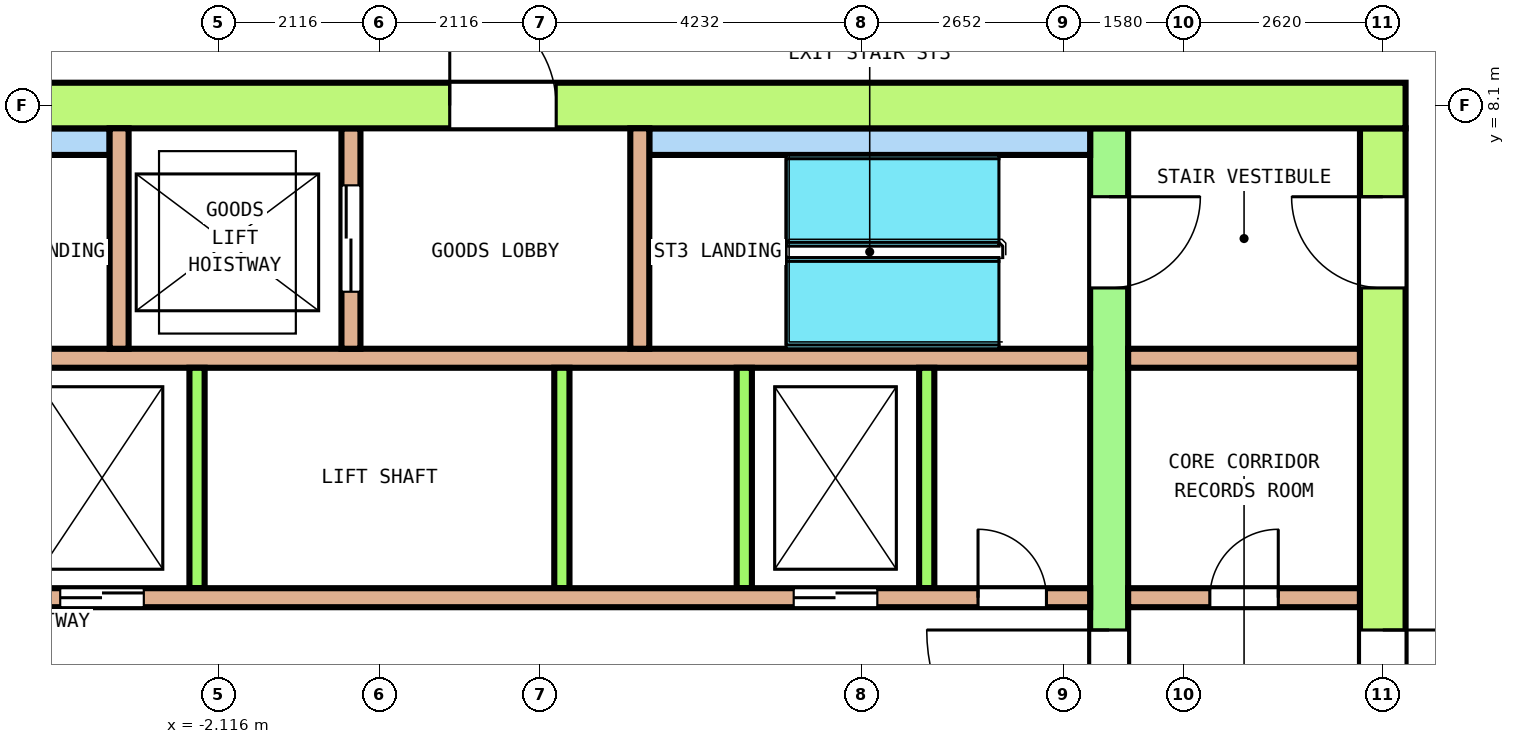
"""IFC4 building model, lengths in metres.
Left out: names, types, materials, properties, quantities, classifications, styles, units other than length and angle.
Written with IfcOpenShell. Run it as: python <this file> out.ifc"""

import sys

from ifc_helpers import new_model, si_unit, direction, frame, frame_2d, origin, place, context, subcontext, project, spatial, rectangle, extrude, element, fill, save


model = new_model("IFC4")
c1 = context("Model", 3, precision=1e-05, world=origin(), true_north=direction((0.0, 1.0)))
c2 = subcontext(c1, "Body", "Model", "MODEL_VIEW")
j1 = project(units=[si_unit("LENGTHUNIT", "METRE"), si_unit("PLANEANGLEUNIT", "RADIAN")], contexts=[c1])
p1 = place(None, origin())
s1 = spatial("IfcSite", under=j1, at=p1, CompositionType="ELEMENT")
p2 = place(p1, origin())
s2 = spatial("IfcBuilding", under=s1, at=p2, CompositionType="ELEMENT")
p3 = place(p2, frame((0.0, 0.0, 215.4)))
s3 = spatial("IfcBuildingStorey", under=s2, at=p3, CompositionType="ELEMENT", Elevation=215.4)
p4 = place(p3, frame((-13.5, 8.1, 0.0), z_axis=(0.0, 0.0, 1.0), x_axis=(1.0, 0.0, 0.0)))
e1 = element("IfcWall", 1, at=p4, inside=s3, PredefinedType="SHEAR", context=c2, shape_type="SweptSolid", body=[
    extrude(rectangle(XDim=27.0, YDim=0.6, at=frame_2d((13.5, 0.0))), origin(), (0.0, 0.0, 1.0), 3.7),
])
p5 = place(p4, frame((14.425, 0.0, 0.0)))
e2 = element("IfcOpeningElement", 2, at=p5, cuts=e1, PredefinedType="OPENING", context=c2, shape_type="SweptSolid", body=[
    extrude(rectangle(XDim=1.4, YDim=2.1, at=frame_2d((0.7, 1.05))), frame((0.0, 0.31, 0.0), z_axis=(0.0, -1.0, 0.0), x_axis=(1.0, 0.0, 0.0)), (0.0, 0.0, 1.0), 0.62),
])
p6 = place(p3, frame((13.2, -7.8, 0.0), z_axis=(0.0, 0.0, 1.0), x_axis=(0.0, 1.0, 0.0)))
e3 = element("IfcWall", 3, at=p6, inside=s3, PredefinedType="SHEAR", context=c2, shape_type="SweptSolid", body=[
    extrude(rectangle(XDim=15.6, YDim=0.6, at=frame_2d((7.8, 0.0))), origin(), (0.0, 0.0, 1.0), 3.7),
])
p7 = place(p6, frame((6.6, 0.0, 0.0)))
e4 = element("IfcOpeningElement", 4, at=p7, cuts=e3, PredefinedType="OPENING", context=c2, shape_type="SweptSolid", body=[
    extrude(rectangle(XDim=2.4, YDim=2.1, at=frame_2d((1.2, 1.05))), frame((0.0, 0.31, 0.0), z_axis=(0.0, -1.0, 0.0), x_axis=(1.0, 0.0, 0.0)), (0.0, 0.0, 1.0), 0.62),
])
p8 = place(p6, frame((13.5, 0.0, 0.0)))
e5 = element("IfcOpeningElement", 5, at=p8, cuts=e3, PredefinedType="OPENING", context=c2, shape_type="SweptSolid", body=[
    extrude(rectangle(XDim=1.2, YDim=2.1, at=frame_2d((0.6, 1.05))), frame((0.0, 0.31, 0.0), z_axis=(0.0, -1.0, 0.0), x_axis=(1.0, 0.0, 0.0)), (0.0, 0.0, 1.0), 0.62),
])
p9 = place(p6, frame((1.0, 0.0, 0.0)))
e6 = element("IfcOpeningElement", 6, at=p9, cuts=e3, PredefinedType="OPENING", context=c2, shape_type="SweptSolid", body=[
    extrude(rectangle(XDim=1.0, YDim=2.1, at=frame_2d((0.5, 1.05))), frame((0.0, 0.31, 0.0), z_axis=(0.0, -1.0, 0.0), x_axis=(1.0, 0.0, 0.0)), (0.0, 0.0, 1.0), 0.62),
])
p10 = place(p3, frame((9.6, -7.8, 0.0), z_axis=(0.0, 0.0, 1.0), x_axis=(0.0, 1.0, 0.0)))
e7 = element("IfcWall", 7, at=p10, inside=s3, PredefinedType="SHEAR", context=c2, shape_type="SweptSolid", body=[
    extrude(rectangle(XDim=15.6, YDim=0.5, at=frame_2d((7.8, 0.0))), origin(), (0.0, 0.0, 1.0), 3.7),
])
p11 = place(p10, frame((6.6, 0.0, 0.0)))
e8 = element("IfcOpeningElement", 8, at=p11, cuts=e7, PredefinedType="OPENING", context=c2, shape_type="SweptSolid", body=[
    extrude(rectangle(XDim=2.4, YDim=2.1, at=frame_2d((1.2, 1.05))), frame((0.0, 0.26, 0.0), z_axis=(0.0, -1.0, 0.0), x_axis=(1.0, 0.0, 0.0)), (0.0, 0.0, 1.0), 0.52),
])
p12 = place(p10, frame((13.5, 0.0, 0.0)))
e9 = element("IfcOpeningElement", 9, at=p12, cuts=e7, PredefinedType="OPENING", context=c2, shape_type="SweptSolid", body=[
    extrude(rectangle(XDim=1.2, YDim=2.1, at=frame_2d((0.6, 1.05))), frame((0.0, 0.26, 0.0), z_axis=(0.0, -1.0, 0.0), x_axis=(1.0, 0.0, 0.0)), (0.0, 0.0, 1.0), 0.52),
])
p13 = place(p10, frame((1.0, 0.0, 0.0)))
e10 = element("IfcOpeningElement", 10, at=p13, cuts=e7, PredefinedType="OPENING", context=c2, shape_type="SweptSolid", body=[
    extrude(rectangle(XDim=1.0, YDim=2.1, at=frame_2d((0.5, 1.05))), frame((0.0, 0.26, 0.0), z_axis=(0.0, -1.0, 0.0), x_axis=(1.0, 0.0, 0.0)), (0.0, 0.0, 1.0), 0.52),
])
p14 = place(p3, frame((-9.35, 1.625, 0.0), z_axis=(0.0, 0.0, 1.0), x_axis=(1.0, 0.0, 0.0)))
e11 = element("IfcWall", 11, at=p14, inside=s3, PredefinedType="SOLIDWALL", context=c2, shape_type="SweptSolid", body=[
    extrude(rectangle(XDim=18.7, YDim=0.25, at=frame_2d((9.35, 0.0))), origin(), (0.0, 0.0, 1.0), 3.7),
])
p15 = place(p14, frame((2.85, 0.0, 0.0)))
e12 = element("IfcOpeningElement", 12, at=p15, cuts=e11, PredefinedType="OPENING", context=c2, shape_type="SweptSolid", body=[
    extrude(rectangle(XDim=1.1, YDim=2.1, at=frame_2d((0.55, 1.05))), frame((0.0, 0.135, 0.0), z_axis=(0.0, -1.0, 0.0), x_axis=(1.0, 0.0, 0.0)), (0.0, 0.0, 1.0), 0.27),
])
p16 = place(p14, frame((5.15, 0.0, 0.0)))
e13 = element("IfcOpeningElement", 13, at=p16, cuts=e11, PredefinedType="OPENING", context=c2, shape_type="SweptSolid", body=[
    extrude(rectangle(XDim=1.1, YDim=2.1, at=frame_2d((0.55, 1.05))), frame((0.0, 0.135, 0.0), z_axis=(0.0, -1.0, 0.0), x_axis=(1.0, 0.0, 0.0)), (0.0, 0.0, 1.0), 0.27),
])
p17 = place(p14, frame((14.8, 0.0, 0.0)))
e14 = element("IfcOpeningElement", 14, at=p17, cuts=e11, PredefinedType="OPENING", context=c2, shape_type="SweptSolid", body=[
    extrude(rectangle(XDim=1.1, YDim=2.1, at=frame_2d((0.55, 1.05))), frame((0.0, 0.135, 0.0), z_axis=(0.0, -1.0, 0.0), x_axis=(1.0, 0.0, 0.0)), (0.0, 0.0, 1.0), 0.27),
])
p18 = place(p14, frame((0.575, 0.0, 0.0)))
e15 = element("IfcOpeningElement", 15, at=p18, cuts=e11, PredefinedType="OPENING", context=c2, shape_type="SweptSolid", body=[
    extrude(rectangle(XDim=0.9, YDim=2.1, at=frame_2d((0.45, 1.05))), frame((0.0, 0.135, 0.0), z_axis=(0.0, -1.0, 0.0), x_axis=(1.0, 0.0, 0.0)), (0.0, 0.0, 1.0), 0.27),
])
p19 = place(p14, frame((17.225, 0.0, 0.0)))
e16 = element("IfcOpeningElement", 16, at=p19, cuts=e11, PredefinedType="OPENING", context=c2, shape_type="SweptSolid", body=[
    extrude(rectangle(XDim=0.9, YDim=2.1, at=frame_2d((0.45, 1.05))), frame((0.0, 0.135, 0.0), z_axis=(0.0, -1.0, 0.0), x_axis=(1.0, 0.0, 0.0)), (0.0, 0.0, 1.0), 0.27),
])
p20 = place(p3, frame((9.85, 1.625, 0.0), z_axis=(0.0, 0.0, 1.0), x_axis=(1.0, 0.0, 0.0)))
e17 = element("IfcWall", 17, at=p20, inside=s3, PredefinedType="SOLIDWALL", context=c2, shape_type="SweptSolid", body=[
    extrude(rectangle(XDim=3.05, YDim=0.25, at=frame_2d((1.525, 0.0))), origin(), (0.0, 0.0, 1.0), 3.7),
])
p21 = place(p20, frame((1.075, 0.0, 0.0)))
e18 = element("IfcOpeningElement", 18, at=p21, cuts=e17, PredefinedType="OPENING", context=c2, shape_type="SweptSolid", body=[
    extrude(rectangle(XDim=0.9, YDim=2.1, at=frame_2d((0.45, 1.05))), frame((0.0, 0.135, 0.0), z_axis=(0.0, -1.0, 0.0), x_axis=(1.0, 0.0, 0.0)), (0.0, 0.0, 1.0), 0.27),
])
p22 = place(p3, frame((-9.35, 4.775, 0.0), z_axis=(0.0, 0.0, 1.0), x_axis=(1.0, 0.0, 0.0)))
e19 = element("IfcWall", 19, at=p22, inside=s3, PredefinedType="SOLIDWALL", context=c2, shape_type="SweptSolid", body=[
    extrude(rectangle(XDim=18.7, YDim=0.25, at=frame_2d((9.35, 0.0))), origin(), (0.0, 0.0, 1.0), 3.7),
])
p23 = place(p3, frame((9.85, 4.775, 0.0), z_axis=(0.0, 0.0, 1.0), x_axis=(1.0, 0.0, 0.0)))
e20 = element("IfcWall", 20, at=p23, inside=s3, PredefinedType="SOLIDWALL", context=c2, shape_type="SweptSolid", body=[
    extrude(rectangle(XDim=3.05, YDim=0.25, at=frame_2d((1.525, 0.0))), origin(), (0.0, 0.0, 1.0), 3.7),
])
for number, where, z_axis, x_axis in (
    (21, (-2.4, 1.75, 0.0), (0.0, 0.0, 1.0), (0.0, 1.0, 0.0)),
    (22, (2.4, 1.75, 0.0), (0.0, 0.0, 1.0), (0.0, 1.0, 0.0)),
    (23, (4.8, 1.75, 0.0), (0.0, 0.0, 1.0), (0.0, 1.0, 0.0)),
    (24, (7.2, 1.75, 0.0), (0.0, 0.0, 1.0), (0.0, 1.0, 0.0)),
):
    element("IfcWall", number, at=place(p3, frame(where, z_axis=z_axis, x_axis=x_axis)), inside=s3, PredefinedType="SOLIDWALL", context=c2, shape_type="SweptSolid", body=[
        extrude(rectangle(XDim=2.9, YDim=0.2, at=frame_2d((1.45, 0.0))), origin(), (0.0, 0.0, 1.0), 3.7),
    ])
for number, where, z_axis, x_axis in (
    (25, (-9.35, 7.625, 0.0), (0.0, 0.0, 1.0), (1.0, 0.0, 0.0)),
    (26, (3.55, 7.625, 0.0), (0.0, 0.0, 1.0), (1.0, 0.0, 0.0)),
):
    element("IfcWall", number, at=place(p3, frame(where, z_axis=z_axis, x_axis=x_axis)), inside=s3, PredefinedType="SOLIDWALL", context=c2, shape_type="SweptSolid", body=[
        extrude(rectangle(XDim=5.8, YDim=0.35, at=frame_2d((2.9, 0.0))), origin(), (0.0, 0.0, 1.0), 3.7),
    ])
p24 = place(p3, frame((-3.425, 4.9, 0.0), z_axis=(0.0, 0.0, 1.0), x_axis=(0.0, 1.0, 0.0)))
e27 = element("IfcWall", 27, at=p24, inside=s3, PredefinedType="SOLIDWALL", context=c2, shape_type="SweptSolid", body=[
    extrude(rectangle(XDim=2.9, YDim=0.25, at=frame_2d((1.45, 0.0))), origin(), (0.0, 0.0, 1.0), 3.7),
])
p25 = place(p3, frame((-0.375, 4.9, 0.0), z_axis=(0.0, 0.0, 1.0), x_axis=(0.0, 1.0, 0.0)))
e28 = element("IfcWall", 28, at=p25, inside=s3, PredefinedType="SOLIDWALL", context=c2, shape_type="SweptSolid", body=[
    extrude(rectangle(XDim=2.9, YDim=0.25, at=frame_2d((1.45, 0.0))), origin(), (0.0, 0.0, 1.0), 3.7),
])
p26 = place(p25, frame((0.75, 0.0, 0.0)))
e29 = element("IfcOpeningElement", 29, at=p26, cuts=e28, PredefinedType="OPENING", context=c2, shape_type="SweptSolid", body=[
    extrude(rectangle(XDim=1.4, YDim=2.1, at=frame_2d((0.7, 1.05))), frame((0.0, 0.135, 0.0), z_axis=(0.0, -1.0, 0.0), x_axis=(1.0, 0.0, 0.0)), (0.0, 0.0, 1.0), 0.27),
])
p27 = place(p3, frame((3.425, 4.9, 0.0), z_axis=(0.0, 0.0, 1.0), x_axis=(0.0, 1.0, 0.0)))
e30 = element("IfcWall", 30, at=p27, inside=s3, PredefinedType="SOLIDWALL", context=c2, shape_type="SweptSolid", body=[
    extrude(rectangle(XDim=2.9, YDim=0.25, at=frame_2d((1.45, 0.0))), origin(), (0.0, 0.0, 1.0), 3.7),
])
p28 = place(p16, origin())
e31 = element("IfcDoor", 31, at=p28, inside=s3, OperationType="DOUBLE_DOOR_SLIDING", PredefinedType="DOOR", context=c2, shape_type="SweptSolid", body=[
    extrude(rectangle(XDim=1.1, YDim=2.1, at=frame_2d((0.55, 1.05))), frame((0.0, 0.075, 0.0), z_axis=(0.0, -1.0, 0.0), x_axis=(1.0, 0.0, 0.0)), (0.0, 0.0, 1.0), 0.15),
])
fill(e13, e31)
p29 = place(p17, origin())
e32 = element("IfcDoor", 32, at=p29, inside=s3, OperationType="DOUBLE_DOOR_SLIDING", PredefinedType="DOOR", context=c2, shape_type="SweptSolid", body=[
    extrude(rectangle(XDim=1.1, YDim=2.1, at=frame_2d((0.55, 1.05))), frame((0.0, 0.075, 0.0), z_axis=(0.0, -1.0, 0.0), x_axis=(1.0, 0.0, 0.0)), (0.0, 0.0, 1.0), 0.15),
])
fill(e14, e32)
p30 = place(p26, origin())
e33 = element("IfcDoor", 33, at=p30, inside=s3, OperationType="DOUBLE_DOOR_SLIDING", PredefinedType="DOOR", context=c2, shape_type="SweptSolid", body=[
    extrude(rectangle(XDim=1.4, YDim=2.1, at=frame_2d((0.7, 1.05))), frame((0.0, 0.075, 0.0), z_axis=(0.0, -1.0, 0.0), x_axis=(1.0, 0.0, 0.0)), (0.0, 0.0, 1.0), 0.15),
])
fill(e29, e33)
p31 = place(p11, origin())
e34 = element("IfcDoor", 34, at=p31, inside=s3, OperationType="DOUBLE_DOOR_SINGLE_SWING", PredefinedType="DOOR", context=c2, shape_type="SweptSolid", body=[
    extrude(rectangle(XDim=2.4, YDim=2.1, at=frame_2d((1.2, 1.05))), frame((0.0, 0.2, 0.0), z_axis=(0.0, -1.0, 0.0), x_axis=(1.0, 0.0, 0.0)), (0.0, 0.0, 1.0), 0.4),
])
fill(e8, e34)
p32 = place(p7, origin())
e35 = element("IfcDoor", 35, at=p32, inside=s3, OperationType="DOUBLE_DOOR_SINGLE_SWING", PredefinedType="DOOR", context=c2, shape_type="SweptSolid", body=[
    extrude(rectangle(XDim=2.4, YDim=2.1, at=frame_2d((1.2, 1.05))), frame((0.0, 0.25, 0.0), z_axis=(0.0, -1.0, 0.0), x_axis=(1.0, 0.0, 0.0)), (0.0, 0.0, 1.0), 0.5),
])
fill(e4, e35)
p33 = place(p12, origin())
e36 = element("IfcDoor", 36, at=p33, inside=s3, OperationType="SINGLE_SWING_RIGHT", PredefinedType="DOOR", context=c2, shape_type="SweptSolid", body=[
    extrude(rectangle(XDim=1.2, YDim=2.1, at=frame_2d((0.6, 1.05))), frame((0.0, 0.2, 0.0), z_axis=(0.0, -1.0, 0.0), x_axis=(1.0, 0.0, 0.0)), (0.0, 0.0, 1.0), 0.4),
])
fill(e9, e36)
p34 = place(p8, origin())
e37 = element("IfcDoor", 37, at=p34, inside=s3, OperationType="SINGLE_SWING_LEFT", PredefinedType="DOOR", context=c2, shape_type="SweptSolid", body=[
    extrude(rectangle(XDim=1.2, YDim=2.1, at=frame_2d((0.6, 1.05))), frame((0.0, 0.25, 0.0), z_axis=(0.0, -1.0, 0.0), x_axis=(1.0, 0.0, 0.0)), (0.0, 0.0, 1.0), 0.5),
])
fill(e5, e37)
p35 = place(p5, origin())
e38 = element("IfcDoor", 38, at=p35, inside=s3, OperationType="DOUBLE_DOOR_SINGLE_SWING", PredefinedType="DOOR", context=c2, shape_type="SweptSolid", body=[
    extrude(rectangle(XDim=1.4, YDim=2.1, at=frame_2d((0.7, 1.05))), frame((0.0, 0.25, 0.0), z_axis=(0.0, -1.0, 0.0), x_axis=(1.0, 0.0, 0.0)), (0.0, 0.0, 1.0), 0.5),
])
fill(e2, e38)
p36 = place(p19, origin())
e39 = element("IfcDoor", 39, at=p36, inside=s3, OperationType="SINGLE_SWING_RIGHT", PredefinedType="DOOR", context=c2, shape_type="SweptSolid", body=[
    extrude(rectangle(XDim=0.9, YDim=2.1, at=frame_2d((0.45, 1.05))), frame((0.0, 0.075, 0.0), z_axis=(0.0, -1.0, 0.0), x_axis=(1.0, 0.0, 0.0)), (0.0, 0.0, 1.0), 0.15),
])
fill(e16, e39)
p37 = place(p21, origin())
e40 = element("IfcDoor", 40, at=p37, inside=s3, OperationType="SINGLE_SWING_LEFT", PredefinedType="DOOR", context=c2, shape_type="SweptSolid", body=[
    extrude(rectangle(XDim=0.9, YDim=2.1, at=frame_2d((0.45, 1.05))), frame((0.0, 0.075, 0.0), z_axis=(0.0, -1.0, 0.0), x_axis=(1.0, 0.0, 0.0)), (0.0, 0.0, 1.0), 0.15),
])
fill(e18, e40)
save(model, sys.argv[1])
